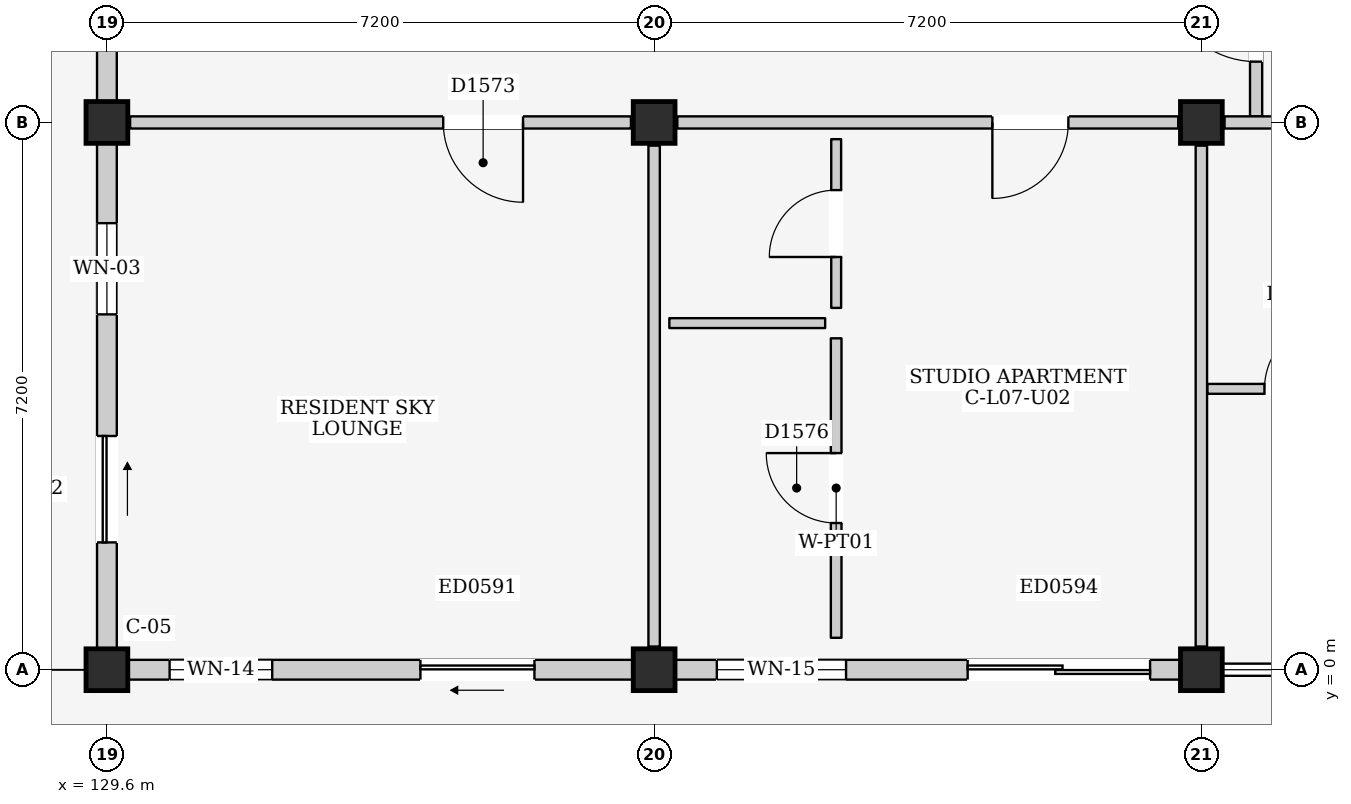
"""IFC4 building model, lengths in metres.
Left out: names, types, materials, properties, quantities, classifications, styles, units other than length and angle.
Written with IfcOpenShell. Run it as: python <this file> out.ifc"""

import sys

from ifc_helpers import new_model, si_unit, direction, frame, frame_2d, origin, origin_2d, place, context, subcontext, project, spatial, rectangle, extrude, element, fill, save


model = new_model("IFC4")
c1 = context("Model", 3, precision=1e-05, world=origin(), true_north=direction((0.0, 1.0)))
c2 = subcontext(c1, "Body", "Model", "MODEL_VIEW")
j1 = project(units=[si_unit("LENGTHUNIT", "METRE"), si_unit("PLANEANGLEUNIT", "RADIAN")], contexts=[c1])
p1 = place(None, origin())
s1 = spatial("IfcSite", under=j1, at=p1, CompositionType="ELEMENT")
p2 = place(p1, origin())
s2 = spatial("IfcBuilding", under=s1, at=p2, CompositionType="ELEMENT")
p3 = place(p2, frame((0.0, 0.0, 25.1)))
s3 = spatial("IfcBuildingStorey", under=s2, at=p3, CompositionType="ELEMENT", Elevation=25.1)
for number, where, z_axis, x_axis in (
    (1, (129.6, 0.0, 0.0), (0.0, 0.0, 1.0), (1.0, 0.0, 0.0)),
    (2, (129.6, 7.2, 0.0), (0.0, 0.0, 1.0), (1.0, 0.0, 0.0)),
    (3, (136.8, 0.0, 0.0), (0.0, 0.0, 1.0), (1.0, 0.0, 0.0)),
    (4, (136.8, 7.2, 0.0), (0.0, 0.0, 1.0), (1.0, 0.0, 0.0)),
    (5, (144.0, 0.0, 0.0), (0.0, 0.0, 1.0), (1.0, 0.0, 0.0)),
    (6, (144.0, 7.2, 0.0), (0.0, 0.0, 1.0), (1.0, 0.0, 0.0)),
):
    element("IfcColumn", number, at=place(p3, frame(where, z_axis=z_axis, x_axis=x_axis)), inside=s3, PredefinedType="COLUMN", context=c2, shape_type="SweptSolid", body=[
        extrude(rectangle(XDim=0.55, YDim=0.55, at=origin_2d()), origin(), (0.0, 0.0, 1.0), 3.2),
    ])
p4 = place(p3, frame((129.875, 0.0, 0.0), z_axis=(0.0, 0.0, 1.0), x_axis=(1.0, 0.0, 0.0)))
e7 = element("IfcWall", 7, at=p4, inside=s3, PredefinedType="ELEMENTEDWALL", context=c2, shape_type="SweptSolid", body=[
    extrude(rectangle(XDim=6.65, YDim=0.26, at=frame_2d((3.325, 0.0))), origin(), (0.0, 0.0, 1.0), 2.525),
])
p5 = place(p4, frame((3.85, 0.0, 0.0)))
e8 = element("IfcOpeningElement", 8, at=p5, cuts=e7, PredefinedType="OPENING", context=c2, shape_type="SweptSolid", body=[
    extrude(rectangle(XDim=1.5, YDim=2.12, at=frame_2d((0.75, 1.06))), frame((0.0, 0.145, 0.0), z_axis=(0.0, -1.0, 0.0), x_axis=(1.0, 0.0, 0.0)), (0.0, 0.0, 1.0), 0.29),
])
p6 = place(p4, frame((0.55, 0.0, 0.9)))
e9 = element("IfcOpeningElement", 9, at=p6, cuts=e7, PredefinedType="OPENING", context=c2, shape_type="SweptSolid", body=[
    extrude(rectangle(XDim=1.35, YDim=1.5, at=frame_2d((0.675, 0.75))), frame((0.0, 0.145, 0.0), z_axis=(0.0, -1.0, 0.0), x_axis=(1.0, 0.0, 0.0)), (0.0, 0.0, 1.0), 0.29),
])
p7 = place(p3, frame((129.6, 0.275, 0.0), z_axis=(0.0, 0.0, 1.0), x_axis=(0.0, 1.0, 0.0)))
e10 = element("IfcWall", 10, at=p7, inside=s3, PredefinedType="ELEMENTEDWALL", context=c2, shape_type="SweptSolid", body=[
    extrude(rectangle(XDim=6.65, YDim=0.26, at=frame_2d((3.325, 0.0))), origin(), (0.0, 0.0, 1.0), 2.475),
])
p8 = place(p7, frame((1.4, 0.0, 0.0)))
e11 = element("IfcOpeningElement", 11, at=p8, cuts=e10, PredefinedType="OPENING", context=c2, shape_type="SweptSolid", body=[
    extrude(rectangle(XDim=1.4, YDim=2.1, at=frame_2d((0.7, 1.05))), frame((0.0, 0.145, 0.0), z_axis=(0.0, -1.0, 0.0), x_axis=(1.0, 0.0, 0.0)), (0.0, 0.0, 1.0), 0.29),
])
p9 = place(p7, frame((4.4, 0.0, 0.95)))
e12 = element("IfcOpeningElement", 12, at=p9, cuts=e10, PredefinedType="OPENING", context=c2, shape_type="SweptSolid", body=[
    extrude(rectangle(XDim=1.2, YDim=1.35, at=frame_2d((0.6, 0.675))), frame((0.0, 0.145, 0.0), z_axis=(0.0, -1.0, 0.0), x_axis=(1.0, 0.0, 0.0)), (0.0, 0.0, 1.0), 0.29),
])
p10 = place(p3, frame((129.6, 7.475, 0.0), z_axis=(0.0, 0.0, 1.0), x_axis=(0.0, 1.0, 0.0)))
e13 = element("IfcWall", 13, at=p10, inside=s3, PredefinedType="ELEMENTEDWALL", context=c2, shape_type="SweptSolid", body=[
    extrude(rectangle(XDim=6.65, YDim=0.26, at=frame_2d((3.325, 0.0))), origin(), (0.0, 0.0, 1.0), 2.475),
])
p11 = place(p10, frame((2.825, 0.0, 1.1)))
e14 = element("IfcOpeningElement", 14, at=p11, cuts=e13, PredefinedType="OPENING", context=c2, shape_type="SweptSolid", body=[
    extrude(rectangle(XDim=1.0, YDim=0.9, at=frame_2d((0.5, 0.45))), frame((0.0, 0.145, 0.0), z_axis=(0.0, -1.0, 0.0), x_axis=(1.0, 0.0, 0.0)), (0.0, 0.0, 1.0), 0.29),
])
p12 = place(p3, frame((137.075, 0.0, 0.0), z_axis=(0.0, 0.0, 1.0), x_axis=(1.0, 0.0, 0.0)))
e15 = element("IfcWall", 15, at=p12, inside=s3, PredefinedType="ELEMENTEDWALL", context=c2, shape_type="SweptSolid", body=[
    extrude(rectangle(XDim=6.65, YDim=0.26, at=frame_2d((3.325, 0.0))), origin(), (0.0, 0.0, 1.0), 2.525),
])
p13 = place(p12, frame((3.85, 0.0, 0.0)))
e16 = element("IfcOpeningElement", 16, at=p13, cuts=e15, PredefinedType="OPENING", context=c2, shape_type="SweptSolid", body=[
    extrude(rectangle(XDim=2.4, YDim=2.12, at=frame_2d((1.2, 1.06))), frame((0.0, 0.145, 0.0), z_axis=(0.0, -1.0, 0.0), x_axis=(1.0, 0.0, 0.0)), (0.0, 0.0, 1.0), 0.29),
])
p14 = place(p12, frame((0.55, 0.0, 0.9)))
e17 = element("IfcOpeningElement", 17, at=p14, cuts=e15, PredefinedType="OPENING", context=c2, shape_type="SweptSolid", body=[
    extrude(rectangle(XDim=1.7, YDim=1.45, at=frame_2d((0.85, 0.725))), frame((0.0, 0.145, 0.0), z_axis=(0.0, -1.0, 0.0), x_axis=(1.0, 0.0, 0.0)), (0.0, 0.0, 1.0), 0.29),
])
p15 = place(p3, frame((144.72, 7.28, 0.0), z_axis=(0.0, 0.0, 1.0), x_axis=(0.0, 1.0, 0.0)))
e18 = element("IfcWall", 18, at=p15, inside=s3, PredefinedType="PARTITIONING", context=c2, shape_type="SweptSolid", body=[
    extrude(rectangle(XDim=4.32, YDim=0.16, at=frame_2d((2.16, 0.0))), origin(), (0.0, 0.0, 1.0), 2.99),
])
p16 = place(p15, frame((0.72, 0.0, 0.0)))
e19 = element("IfcOpeningElement", 19, at=p16, cuts=e18, PredefinedType="OPENING", context=c2, shape_type="SweptSolid", body=[
    extrude(rectangle(XDim=1.2, YDim=2.2, at=frame_2d((0.6, 1.1))), frame((0.0, 0.095, 0.0), z_axis=(0.0, -1.0, 0.0), x_axis=(1.0, 0.0, 0.0)), (0.0, 0.0, 1.0), 0.19),
])
p17 = place(p3, frame((129.905, 7.2, 0.0), z_axis=(0.0, 0.0, 1.0), x_axis=(1.0, 0.0, 0.0)))
e20 = element("IfcWall", 20, at=p17, inside=s3, PredefinedType="PARTITIONING", context=c2, shape_type="SweptSolid", body=[
    extrude(rectangle(XDim=6.59, YDim=0.16, at=frame_2d((3.295, 0.0))), origin(), (0.0, 0.0, 1.0), 2.375),
])
p18 = place(p17, frame((4.12, 0.0, 0.0)))
e21 = element("IfcOpeningElement", 21, at=p18, cuts=e20, PredefinedType="OPENING", context=c2, shape_type="SweptSolid", body=[
    extrude(rectangle(XDim=1.05, YDim=2.2, at=frame_2d((0.525, 1.1))), frame((0.0, 0.095, 0.0), z_axis=(0.0, -1.0, 0.0), x_axis=(1.0, 0.0, 0.0)), (0.0, 0.0, 1.0), 0.19),
])
p19 = place(p3, frame((136.8, 0.305, 0.0), z_axis=(0.0, 0.0, 1.0), x_axis=(0.0, 1.0, 0.0)))
e22 = element("IfcWall", 22, at=p19, inside=s3, PredefinedType="PARTITIONING", context=c2, shape_type="SweptSolid", body=[
    extrude(rectangle(XDim=6.59, YDim=0.15, at=frame_2d((3.295, 0.0))), origin(), (0.0, 0.0, 1.0), 2.475),
])
p20 = place(p3, frame((137.105, 7.2, 0.0), z_axis=(0.0, 0.0, 1.0), x_axis=(1.0, 0.0, 0.0)))
e23 = element("IfcWall", 23, at=p20, inside=s3, PredefinedType="PARTITIONING", context=c2, shape_type="SweptSolid", body=[
    extrude(rectangle(XDim=6.59, YDim=0.16, at=frame_2d((3.295, 0.0))), origin(), (0.0, 0.0, 1.0), 2.375),
])
p21 = place(p20, frame((4.145, 0.0, 0.0)))
e24 = element("IfcOpeningElement", 24, at=p21, cuts=e23, PredefinedType="OPENING", context=c2, shape_type="SweptSolid", body=[
    extrude(rectangle(XDim=1.0, YDim=2.15, at=frame_2d((0.5, 1.075))), frame((0.0, 0.095, 0.0), z_axis=(0.0, -1.0, 0.0), x_axis=(1.0, 0.0, 0.0)), (0.0, 0.0, 1.0), 0.19),
])
p22 = place(p3, frame((144.0, 0.305, 0.0), z_axis=(0.0, 0.0, 1.0), x_axis=(0.0, 1.0, 0.0)))
e25 = element("IfcWall", 25, at=p22, inside=s3, PredefinedType="PARTITIONING", context=c2, shape_type="SweptSolid", body=[
    extrude(rectangle(XDim=6.59, YDim=0.15, at=frame_2d((3.295, 0.0))), origin(), (0.0, 0.0, 1.0), 2.475),
])
p23 = place(p3, frame((137.0, 4.56, 0.0), z_axis=(0.0, 0.0, 1.0), x_axis=(1.0, 0.0, 0.0)))
e26 = element("IfcWall", 26, at=p23, inside=s3, PredefinedType="PARTITIONING", context=c2, shape_type="SweptSolid", body=[
    extrude(rectangle(XDim=2.05, YDim=0.13, at=frame_2d((1.025, 0.0))), origin(), (0.0, 0.0, 1.0), 2.99),
])
p24 = place(p3, frame((139.195, 4.76, 0.0), z_axis=(0.0, 0.0, 1.0), x_axis=(0.0, 1.0, 0.0)))
e27 = element("IfcWall", 27, at=p24, inside=s3, PredefinedType="PARTITIONING", context=c2, shape_type="SweptSolid", body=[
    extrude(rectangle(XDim=2.22, YDim=0.13, at=frame_2d((1.11, 0.0))), origin(), (0.0, 0.0, 1.0), 2.99),
])
p25 = place(p24, frame((0.67, 0.0, 0.0)))
e28 = element("IfcOpeningElement", 28, at=p25, cuts=e27, PredefinedType="OPENING", context=c2, shape_type="SweptSolid", body=[
    extrude(rectangle(XDim=0.88, YDim=2.1, at=frame_2d((0.44, 1.05))), frame((0.0, 0.08, 0.0), z_axis=(0.0, -1.0, 0.0), x_axis=(1.0, 0.0, 0.0)), (0.0, 0.0, 1.0), 0.16),
])
p26 = place(p3, frame((139.195, 0.42, 0.0), z_axis=(0.0, 0.0, 1.0), x_axis=(0.0, 1.0, 0.0)))
e29 = element("IfcWall", 29, at=p26, inside=s3, PredefinedType="PARTITIONING", context=c2, shape_type="SweptSolid", body=[
    extrude(rectangle(XDim=3.94, YDim=0.14, at=frame_2d((1.97, 0.0))), origin(), (0.0, 0.0, 1.0), 2.99),
])
p27 = place(p26, frame((1.51, 0.0, 0.0)))
e30 = element("IfcOpeningElement", 30, at=p27, cuts=e29, PredefinedType="OPENING", context=c2, shape_type="SweptSolid", body=[
    extrude(rectangle(XDim=0.92, YDim=2.1, at=frame_2d((0.46, 1.05))), frame((0.0, 0.085, 0.0), z_axis=(0.0, -1.0, 0.0), x_axis=(1.0, 0.0, 0.0)), (0.0, 0.0, 1.0), 0.17),
])
p28 = place(p3, frame((144.305, 7.2, 0.0), z_axis=(0.0, 0.0, 1.0), x_axis=(1.0, 0.0, 0.0)))
e31 = element("IfcWall", 31, at=p28, inside=s3, PredefinedType="PARTITIONING", context=c2, shape_type="SweptSolid", body=[
    extrude(rectangle(XDim=6.59, YDim=0.16, at=frame_2d((3.295, 0.0))), origin(), (0.0, 0.0, 1.0), 2.375),
])
p29 = place(p3, frame((144.08, 3.695, 0.0), z_axis=(0.0, 0.0, 1.0), x_axis=(1.0, 0.0, 0.0)))
e32 = element("IfcWall", 32, at=p29, inside=s3, PredefinedType="PARTITIONING", context=c2, shape_type="SweptSolid", body=[
    extrude(rectangle(XDim=2.4, YDim=0.13, at=frame_2d((1.2, 0.0))), origin(), (0.0, 0.0, 1.0), 2.99),
])
p30 = place(p29, frame((0.75, 0.0, 0.0)))
e33 = element("IfcOpeningElement", 33, at=p30, cuts=e32, PredefinedType="OPENING", context=c2, shape_type="SweptSolid", body=[
    extrude(rectangle(XDim=0.9, YDim=2.1, at=frame_2d((0.45, 1.05))), frame((0.0, 0.08, 0.0), z_axis=(0.0, -1.0, 0.0), x_axis=(1.0, 0.0, 0.0)), (0.0, 0.0, 1.0), 0.16),
])
p31 = place(p5, frame((1.5, 0.0, 0.0), z_axis=(0.0, 0.0, 1.0), x_axis=(-1.0, 0.0, 0.0)))
e34 = element("IfcDoor", 34, at=p31, inside=s3, OperationType="SLIDING_TO_LEFT", PredefinedType="DOOR", context=c2, shape_type="SweptSolid", body=[
    extrude(rectangle(XDim=1.5, YDim=2.12, at=frame_2d((0.75, 1.06))), frame((0.0, 0.025, 0.0), z_axis=(0.0, -1.0, 0.0), x_axis=(1.0, 0.0, 0.0)), (0.0, 0.0, 1.0), 0.05),
])
fill(e8, e34)
p32 = place(p6, origin())
e35 = element("IfcWindow", 35, at=p32, inside=s3, PartitioningType="SINGLE_PANEL", PredefinedType="WINDOW", context=c2, shape_type="SweptSolid", body=[
    extrude(rectangle(XDim=1.35, YDim=1.5, at=frame_2d((0.675, 0.75))), frame((0.0, 0.03, 0.0), z_axis=(0.0, -1.0, 0.0), x_axis=(1.0, 0.0, 0.0)), (0.0, 0.0, 1.0), 0.06),
])
fill(e9, e35)
p33 = place(p8, frame((1.4, 0.0, 0.0), z_axis=(0.0, 0.0, 1.0), x_axis=(-1.0, 0.0, 0.0)))
e36 = element("IfcDoor", 36, at=p33, inside=s3, OperationType="SLIDING_TO_RIGHT", PredefinedType="DOOR", context=c2, shape_type="SweptSolid", body=[
    extrude(rectangle(XDim=1.4, YDim=2.1, at=frame_2d((0.7, 1.05))), frame((0.0, 0.025, 0.0), z_axis=(0.0, -1.0, 0.0), x_axis=(1.0, 0.0, 0.0)), (0.0, 0.0, 1.0), 0.05),
])
fill(e11, e36)
p34 = place(p9, origin())
e37 = element("IfcWindow", 37, at=p34, inside=s3, PartitioningType="SINGLE_PANEL", PredefinedType="WINDOW", context=c2, shape_type="SweptSolid", body=[
    extrude(rectangle(XDim=1.2, YDim=1.35, at=frame_2d((0.6, 0.675))), frame((0.0, 0.03, 0.0), z_axis=(0.0, -1.0, 0.0), x_axis=(1.0, 0.0, 0.0)), (0.0, 0.0, 1.0), 0.06),
])
fill(e12, e37)
p35 = place(p13, frame((2.4, 0.0, 0.0), z_axis=(0.0, 0.0, 1.0), x_axis=(-1.0, 0.0, 0.0)))
e38 = element("IfcDoor", 38, at=p35, inside=s3, OperationType="DOUBLE_DOOR_SLIDING", PredefinedType="DOOR", context=c2, shape_type="SweptSolid", body=[
    extrude(rectangle(XDim=2.4, YDim=2.12, at=frame_2d((1.2, 1.06))), frame((0.0, 0.025, 0.0), z_axis=(0.0, -1.0, 0.0), x_axis=(1.0, 0.0, 0.0)), (0.0, 0.0, 1.0), 0.05),
])
fill(e16, e38)
p36 = place(p14, origin())
e39 = element("IfcWindow", 39, at=p36, inside=s3, PartitioningType="DOUBLE_PANEL_VERTICAL", PredefinedType="WINDOW", context=c2, shape_type="SweptSolid", body=[
    extrude(rectangle(XDim=1.7, YDim=1.45, at=frame_2d((0.85, 0.725))), frame((0.0, 0.03, 0.0), z_axis=(0.0, -1.0, 0.0), x_axis=(1.0, 0.0, 0.0)), (0.0, 0.0, 1.0), 0.06),
])
fill(e17, e39)
p37 = place(p16, origin())
e40 = element("IfcDoor", 40, at=p37, inside=s3, OperationType="SINGLE_SWING_RIGHT", PredefinedType="DOOR", context=c2, shape_type="SweptSolid", body=[
    extrude(rectangle(XDim=1.2, YDim=2.2, at=frame_2d((0.6, 1.1))), frame((0.0, 0.025, 0.0), z_axis=(0.0, -1.0, 0.0), x_axis=(1.0, 0.0, 0.0)), (0.0, 0.0, 1.0), 0.05),
])
fill(e19, e40)
p38 = place(p18, frame((1.05, 0.0, 0.0), z_axis=(0.0, 0.0, 1.0), x_axis=(-1.0, 0.0, 0.0)))
e41 = element("IfcDoor", 41, at=p38, inside=s3, OperationType="SINGLE_SWING_LEFT", PredefinedType="DOOR", context=c2, shape_type="SweptSolid", body=[
    extrude(rectangle(XDim=1.05, YDim=2.2, at=frame_2d((0.525, 1.1))), frame((0.0, 0.025, 0.0), z_axis=(0.0, -1.0, 0.0), x_axis=(1.0, 0.0, 0.0)), (0.0, 0.0, 1.0), 0.05),
])
fill(e21, e41)
p39 = place(p21, frame((1.0, 0.0, 0.0), z_axis=(0.0, 0.0, 1.0), x_axis=(-1.0, 0.0, 0.0)))
e42 = element("IfcDoor", 42, at=p39, inside=s3, OperationType="SINGLE_SWING_RIGHT", PredefinedType="DOOR", context=c2, shape_type="SweptSolid", body=[
    extrude(rectangle(XDim=1.0, YDim=2.15, at=frame_2d((0.5, 1.075))), frame((0.0, 0.025, 0.0), z_axis=(0.0, -1.0, 0.0), x_axis=(1.0, 0.0, 0.0)), (0.0, 0.0, 1.0), 0.05),
])
fill(e24, e42)
p40 = place(p25, origin())
e43 = element("IfcDoor", 43, at=p40, inside=s3, OperationType="SINGLE_SWING_LEFT", PredefinedType="DOOR", context=c2, shape_type="SweptSolid", body=[
    extrude(rectangle(XDim=0.88, YDim=2.1, at=frame_2d((0.44, 1.05))), frame((0.0, 0.025, 0.0), z_axis=(0.0, -1.0, 0.0), x_axis=(1.0, 0.0, 0.0)), (0.0, 0.0, 1.0), 0.05),
])
fill(e28, e43)
p41 = place(p27, origin())
e44 = element("IfcDoor", 44, at=p41, inside=s3, OperationType="SINGLE_SWING_RIGHT", PredefinedType="DOOR", context=c2, shape_type="SweptSolid", body=[
    extrude(rectangle(XDim=0.92, YDim=2.1, at=frame_2d((0.46, 1.05))), frame((0.0, 0.025, 0.0), z_axis=(0.0, -1.0, 0.0), x_axis=(1.0, 0.0, 0.0)), (0.0, 0.0, 1.0), 0.05),
])
fill(e30, e44)
p42 = place(p30, origin())
e45 = element("IfcDoor", 45, at=p42, inside=s3, OperationType="SINGLE_SWING_RIGHT", PredefinedType="DOOR", context=c2, shape_type="SweptSolid", body=[
    extrude(rectangle(XDim=0.9, YDim=2.1, at=frame_2d((0.45, 1.05))), frame((0.0, 0.025, 0.0), z_axis=(0.0, -1.0, 0.0), x_axis=(1.0, 0.0, 0.0)), (0.0, 0.0, 1.0), 0.05),
])
fill(e33, e45)
save(model, sys.argv[1])
